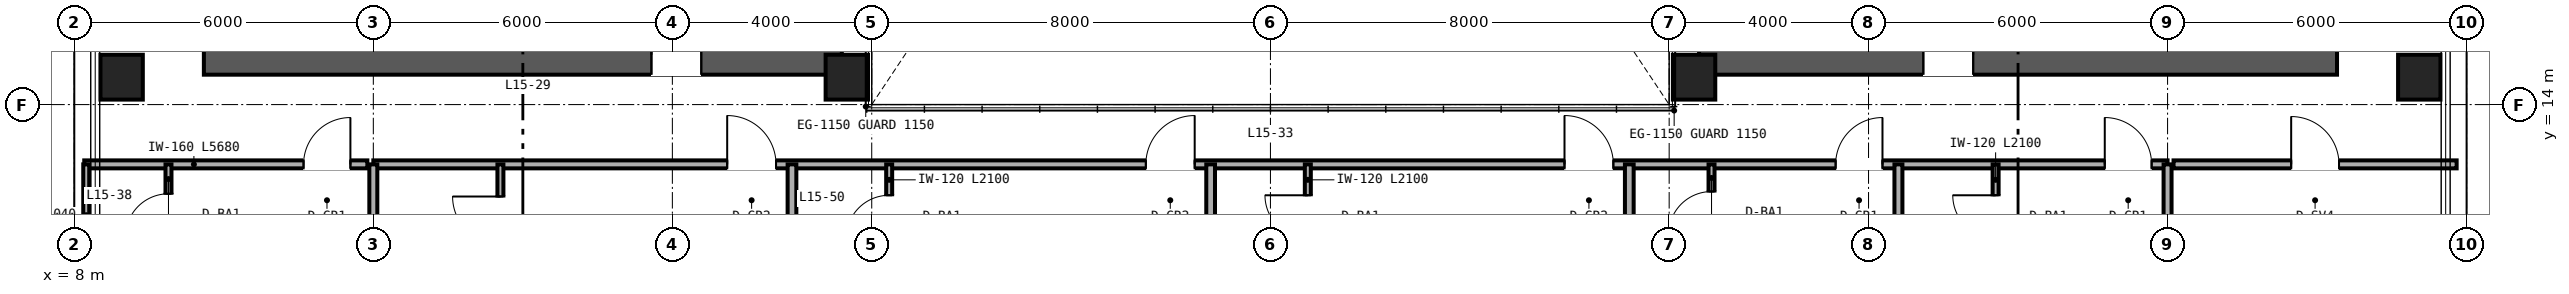
"""IFC4 building model, lengths in metres.
Left out: names, types, materials, properties, quantities, classifications, styles, units other than length and angle.
Written with IfcOpenShell. Run it as: python <this file> out.ifc"""

import sys

from ifc_helpers import new_model, si_unit, direction, frame, frame_2d, origin, origin_2d, place, context, subcontext, project, spatial, rectangle, hollow_rectangle, extrude, source, transform, mapped, element, fill, save


model = new_model("IFC4")
c1 = context("Model", 3, precision=1e-05, world=origin(), true_north=direction((0.0, 1.0)))
c2 = subcontext(c1, "Body", "Model", "MODEL_VIEW")
j1 = project(units=[si_unit("LENGTHUNIT", "METRE"), si_unit("PLANEANGLEUNIT", "RADIAN")], contexts=[c1])
p1 = place(None, origin())
s1 = spatial("IfcSite", under=j1, at=p1, CompositionType="ELEMENT")
p2 = place(p1, origin())
s2 = spatial("IfcBuilding", under=s1, at=p2, CompositionType="ELEMENT")
p3 = place(p2, frame((0.0, 0.0, 63.6)))
s3 = spatial("IfcBuildingStorey", under=s2, at=p3, CompositionType="ELEMENT", Elevation=63.6)
p4 = place(p3, frame((10.6, 15.0, 0.0), z_axis=(0.0, 0.0, 1.0), x_axis=(1.0, 0.0, 0.0)))
e1 = element("IfcWall", 1, at=p4, inside=s3, PredefinedType="SHEAR", context=c2, shape_type="SweptSolid", body=[
    extrude(rectangle(XDim=12.8, YDim=0.8, at=frame_2d((6.4, 0.0))), origin(), (0.0, 0.0, 1.0), 3.35),
])
p5 = place(p4, frame((8.98, 0.0, 0.0)))
e2 = element("IfcOpeningElement", 2, at=p5, cuts=e1, PredefinedType="OPENING", context=c2, shape_type="SweptSolid", body=[
    extrude(rectangle(XDim=1.0, YDim=2.15, at=frame_2d((0.5, 1.075))), frame((0.0, 0.41, 0.0), z_axis=(0.0, -1.0, 0.0), x_axis=(1.0, 0.0, 0.0)), (0.0, 0.0, 1.0), 0.82),
])
p6 = place(p3, frame((40.6, 15.0, 0.0), z_axis=(0.0, 0.0, 1.0), x_axis=(1.0, 0.0, 0.0)))
e3 = element("IfcWall", 3, at=p6, inside=s3, PredefinedType="SHEAR", context=c2, shape_type="SweptSolid", body=[
    extrude(rectangle(XDim=12.8, YDim=0.8, at=frame_2d((6.4, 0.0))), origin(), (0.0, 0.0, 1.0), 3.35),
])
p7 = place(p6, frame((4.5, 0.0, 0.0)))
e4 = element("IfcOpeningElement", 4, at=p7, cuts=e3, PredefinedType="OPENING", context=c2, shape_type="SweptSolid", body=[
    extrude(rectangle(XDim=1.0, YDim=2.15, at=frame_2d((0.5, 1.075))), frame((0.0, 0.41, 0.0), z_axis=(0.0, -1.0, 0.0), x_axis=(1.0, 0.0, 0.0)), (0.0, 0.0, 1.0), 0.82),
])
m1 = source(origin(), c2, "Body", "SweptSolid", [
    extrude(hollow_rectangle(XDim=0.85, YDim=0.9, WallThickness=0.04, at=origin_2d()), origin(), (0.0, 0.0, 1.0), 3.35),
])
for number, where, z_axis, x_axis in (
    (5, (8.95, 14.55, 0.0), (0.0, 0.0, 1.0), (1.0, 0.0, 0.0)),
    (6, (23.5, 14.55, 0.0), (0.0, 0.0, 1.0), (1.0, 0.0, 0.0)),
    (7, (40.5, 14.55, 0.0), (0.0, 0.0, 1.0), (1.0, 0.0, 0.0)),
    (8, (55.05, 14.55, 0.0), (0.0, 0.0, 1.0), (1.0, 0.0, 0.0)),
):
    element("IfcColumn", number, at=place(p3, frame(where, z_axis=z_axis, x_axis=x_axis)), inside=s3, PredefinedType="COLUMN", context=c2, shape_type="MappedRepresentation", body=[
        mapped(m1, transform((0.0, 0.0, 0.0), scale=1.0)),
    ])
p8 = place(p3, frame((8.2, 12.8, 0.0), z_axis=(0.0, 0.0, 1.0), x_axis=(1.0, 0.0, 0.0)))
e9 = element("IfcWall", 9, at=p8, inside=s3, PredefinedType="PARTITIONING", context=c2, shape_type="SweptSolid", body=[
    extrude(rectangle(XDim=5.68, YDim=0.16, at=frame_2d((2.84, 0.0))), origin(), (0.0, 0.0, 1.0), 3.35),
])
p9 = place(p8, frame((4.4, 0.0, 0.0)))
e10 = element("IfcOpeningElement", 10, at=p9, cuts=e9, PredefinedType="OPENING", context=c2, shape_type="SweptSolid", body=[
    extrude(rectangle(XDim=0.94, YDim=2.15, at=frame_2d((0.47, 1.075))), frame((0.0, 0.09, 0.0), z_axis=(0.0, -1.0, 0.0), x_axis=(1.0, 0.0, 0.0)), (0.0, 0.0, 1.0), 0.18),
])
p10 = place(p3, frame((9.89, 10.76, 0.0), z_axis=(0.0, 0.0, 1.0), x_axis=(0.0, 1.0, 0.0)))
e11 = element("IfcWall", 11, at=p10, inside=s3, PredefinedType="PARTITIONING", context=c2, shape_type="SweptSolid", body=[
    extrude(rectangle(XDim=2.04, YDim=0.12, at=frame_2d((1.02, 0.0))), origin(), (0.0, 0.0, 1.0), 3.35),
])
p11 = place(p10, frame((0.59, 0.0, 0.0)))
e12 = element("IfcOpeningElement", 12, at=p11, cuts=e11, PredefinedType="OPENING", context=c2, shape_type="SweptSolid", body=[
    extrude(rectangle(XDim=0.86, YDim=2.1, at=frame_2d((0.43, 1.05))), frame((0.0, 0.07, 0.0), z_axis=(0.0, -1.0, 0.0), x_axis=(1.0, 0.0, 0.0)), (0.0, 0.0, 1.0), 0.14),
])
p12 = place(p3, frame((8.24, 10.76, 0.0), z_axis=(0.0, 0.0, 1.0), x_axis=(0.0, 1.0, 0.0)))
e13 = element("IfcWall", 13, at=p12, inside=s3, PredefinedType="PARTITIONING", context=c2, shape_type="SweptSolid", body=[
    extrude(rectangle(XDim=2.04, YDim=0.12, at=frame_2d((1.02, 0.0))), origin(), (0.0, 0.0, 1.0), 3.35),
])
p13 = place(p3, frame((50.12, 12.8, 0.0), z_axis=(0.0, 0.0, 1.0), x_axis=(1.0, 0.0, 0.0)))
e14 = element("IfcWall", 14, at=p13, inside=s3, PredefinedType="PARTITIONING", context=c2, shape_type="SweptSolid", body=[
    extrude(rectangle(XDim=5.68, YDim=0.16, at=frame_2d((2.84, 0.0))), origin(), (0.0, 0.0, 1.0), 3.35),
])
p14 = place(p13, frame((2.36, 0.0, 0.0)))
e15 = element("IfcOpeningElement", 15, at=p14, cuts=e14, PredefinedType="OPENING", context=c2, shape_type="SweptSolid", body=[
    extrude(rectangle(XDim=0.96, YDim=2.15, at=frame_2d((0.48, 1.075))), frame((0.0, 0.09, 0.0), z_axis=(0.0, -1.0, 0.0), x_axis=(1.0, 0.0, 0.0)), (0.0, 0.0, 1.0), 0.18),
])
p15 = place(p3, frame((14.0, 12.8, 0.0), z_axis=(0.0, 0.0, 1.0), x_axis=(1.0, 0.0, 0.0)))
e16 = element("IfcWall", 16, at=p15, inside=s3, PredefinedType="PARTITIONING", context=c2, shape_type="SweptSolid", body=[
    extrude(rectangle(XDim=36.0, YDim=0.16, at=frame_2d((18.0, 0.0))), origin(), (0.0, 0.0, 1.0), 2.571),
])
p16 = place(p15, frame((7.1, 0.0, 0.0)))
e17 = element("IfcOpeningElement", 17, at=p16, cuts=e16, PredefinedType="OPENING", context=c2, shape_type="SweptSolid", body=[
    extrude(rectangle(XDim=0.98, YDim=2.2, at=frame_2d((0.49, 1.1))), frame((0.0, 0.09, 0.0), z_axis=(0.0, -1.0, 0.0), x_axis=(1.0, 0.0, 0.0)), (0.0, 0.0, 1.0), 0.18),
])
p17 = place(p15, frame((15.5, 0.0, 0.0)))
e18 = element("IfcOpeningElement", 18, at=p17, cuts=e16, PredefinedType="OPENING", context=c2, shape_type="SweptSolid", body=[
    extrude(rectangle(XDim=0.98, YDim=2.2, at=frame_2d((0.49, 1.1))), frame((0.0, 0.09, 0.0), z_axis=(0.0, -1.0, 0.0), x_axis=(1.0, 0.0, 0.0)), (0.0, 0.0, 1.0), 0.18),
])
p18 = place(p15, frame((23.9, 0.0, 0.0)))
e19 = element("IfcOpeningElement", 19, at=p18, cuts=e16, PredefinedType="OPENING", context=c2, shape_type="SweptSolid", body=[
    extrude(rectangle(XDim=0.98, YDim=2.2, at=frame_2d((0.49, 1.1))), frame((0.0, 0.09, 0.0), z_axis=(0.0, -1.0, 0.0), x_axis=(1.0, 0.0, 0.0)), (0.0, 0.0, 1.0), 0.18),
])
p19 = place(p15, frame((29.34, 0.0, 0.0)))
e20 = element("IfcOpeningElement", 20, at=p19, cuts=e16, PredefinedType="OPENING", context=c2, shape_type="SweptSolid", body=[
    extrude(rectangle(XDim=0.94, YDim=2.15, at=frame_2d((0.47, 1.075))), frame((0.0, 0.09, 0.0), z_axis=(0.0, -1.0, 0.0), x_axis=(1.0, 0.0, 0.0)), (0.0, 0.0, 1.0), 0.18),
])
p20 = place(p15, frame((34.74, 0.0, 0.0)))
e21 = element("IfcOpeningElement", 21, at=p20, cuts=e16, PredefinedType="OPENING", context=c2, shape_type="SweptSolid", body=[
    extrude(rectangle(XDim=0.94, YDim=2.15, at=frame_2d((0.47, 1.075))), frame((0.0, 0.09, 0.0), z_axis=(0.0, -1.0, 0.0), x_axis=(1.0, 0.0, 0.0)), (0.0, 0.0, 1.0), 0.18),
])
for number, where, z_axis, x_axis in (
    (22, (14.0, 2.36, 0.0), (0.0, 0.0, 1.0), (0.0, 1.0, 0.0)),
    (23, (50.0, 2.36, 0.0), (0.0, 0.0, 1.0), (0.0, 1.0, 0.0)),
):
    element("IfcWall", number, at=place(p3, frame(where, z_axis=z_axis, x_axis=x_axis)), inside=s3, PredefinedType="PARTITIONING", context=c2, shape_type="SweptSolid", body=[
        extrude(rectangle(XDim=10.44, YDim=0.16, at=frame_2d((5.22, 0.0))), origin(), (0.0, 0.0, 1.0), 2.657),
    ])
p21 = place(p3, frame((22.4, 2.36, 0.0), z_axis=(0.0, 0.0, 1.0), x_axis=(0.0, 1.0, 0.0)))
e24 = element("IfcWall", 24, at=p21, inside=s3, PredefinedType="PARTITIONING", context=c2, shape_type="SweptSolid", body=[
    extrude(rectangle(XDim=10.44, YDim=0.175, at=frame_2d((5.22, 0.0))), origin(), (0.0, 0.0, 1.0), 2.813),
])
p22 = place(p3, frame((16.55, 10.55, 0.0), z_axis=(0.0, 0.0, 1.0), x_axis=(0.0, 1.0, 0.0)))
e25 = element("IfcWall", 25, at=p22, inside=s3, PredefinedType="PARTITIONING", context=c2, shape_type="SweptSolid", body=[
    extrude(rectangle(XDim=2.25, YDim=0.12, at=frame_2d((1.125, 0.0))), origin(), (0.0, 0.0, 1.0), 3.35),
])
p23 = place(p22, frame((0.645, 0.0, 0.0)))
e26 = element("IfcOpeningElement", 26, at=p23, cuts=e25, PredefinedType="OPENING", context=c2, shape_type="SweptSolid", body=[
    extrude(rectangle(XDim=0.96, YDim=2.15, at=frame_2d((0.48, 1.075))), frame((0.0, 0.07, 0.0), z_axis=(0.0, -1.0, 0.0), x_axis=(1.0, 0.0, 0.0)), (0.0, 0.0, 1.0), 0.14),
])
p24 = place(p3, frame((30.8, 2.36, 0.0), z_axis=(0.0, 0.0, 1.0), x_axis=(0.0, 1.0, 0.0)))
e27 = element("IfcWall", 27, at=p24, inside=s3, PredefinedType="PARTITIONING", context=c2, shape_type="SweptSolid", body=[
    extrude(rectangle(XDim=10.44, YDim=0.175, at=frame_2d((5.22, 0.0))), origin(), (0.0, 0.0, 1.0), 2.423),
])
p25 = place(p3, frame((24.35, 10.7, 0.0), z_axis=(0.0, 0.0, 1.0), x_axis=(0.0, 1.0, 0.0)))
e28 = element("IfcWall", 28, at=p25, inside=s3, PredefinedType="PARTITIONING", context=c2, shape_type="SweptSolid", body=[
    extrude(rectangle(XDim=2.1, YDim=0.12, at=frame_2d((1.05, 0.0))), origin(), (0.0, 0.0, 1.0), 3.35),
])
p26 = place(p25, frame((0.62, 0.0, 0.0)))
e29 = element("IfcOpeningElement", 29, at=p26, cuts=e28, PredefinedType="OPENING", context=c2, shape_type="SweptSolid", body=[
    extrude(rectangle(XDim=0.86, YDim=2.1, at=frame_2d((0.43, 1.05))), frame((0.0, 0.07, 0.0), z_axis=(0.0, -1.0, 0.0), x_axis=(1.0, 0.0, 0.0)), (0.0, 0.0, 1.0), 0.14),
])
p27 = place(p3, frame((39.2, 2.36, 0.0), z_axis=(0.0, 0.0, 1.0), x_axis=(0.0, 1.0, 0.0)))
e30 = element("IfcWall", 30, at=p27, inside=s3, PredefinedType="PARTITIONING", context=c2, shape_type="SweptSolid", body=[
    extrude(rectangle(XDim=10.44, YDim=0.175, at=frame_2d((5.22, 0.0))), origin(), (0.0, 0.0, 1.0), 2.423),
])
p28 = place(p3, frame((32.75, 10.7, 0.0), z_axis=(0.0, 0.0, 1.0), x_axis=(0.0, 1.0, 0.0)))
e31 = element("IfcWall", 31, at=p28, inside=s3, PredefinedType="PARTITIONING", context=c2, shape_type="SweptSolid", body=[
    extrude(rectangle(XDim=2.1, YDim=0.12, at=frame_2d((1.05, 0.0))), origin(), (0.0, 0.0, 1.0), 3.35),
])
p29 = place(p28, frame((0.62, 0.0, 0.0)))
e32 = element("IfcOpeningElement", 32, at=p29, cuts=e31, PredefinedType="OPENING", context=c2, shape_type="SweptSolid", body=[
    extrude(rectangle(XDim=0.86, YDim=2.1, at=frame_2d((0.43, 1.05))), frame((0.0, 0.07, 0.0), z_axis=(0.0, -1.0, 0.0), x_axis=(1.0, 0.0, 0.0)), (0.0, 0.0, 1.0), 0.14),
])
p30 = place(p3, frame((44.6, 2.36, 0.0), z_axis=(0.0, 0.0, 1.0), x_axis=(0.0, 1.0, 0.0)))
e33 = element("IfcWall", 33, at=p30, inside=s3, PredefinedType="PARTITIONING", context=c2, shape_type="SweptSolid", body=[
    extrude(rectangle(XDim=10.44, YDim=0.16, at=frame_2d((5.22, 0.0))), origin(), (0.0, 0.0, 1.0), 2.657),
])
p31 = place(p3, frame((40.85, 10.85, 0.0), z_axis=(0.0, 0.0, 1.0), x_axis=(0.0, 1.0, 0.0)))
e34 = element("IfcWall", 34, at=p31, inside=s3, PredefinedType="PARTITIONING", context=c2, shape_type="SweptSolid", body=[
    extrude(rectangle(XDim=1.95, YDim=0.12, at=frame_2d((0.975, 0.0))), origin(), (0.0, 0.0, 1.0), 3.35),
])
p32 = place(p31, frame((0.545, 0.0, 0.0)))
e35 = element("IfcOpeningElement", 35, at=p32, cuts=e34, PredefinedType="OPENING", context=c2, shape_type="SweptSolid", body=[
    extrude(rectangle(XDim=0.86, YDim=2.1, at=frame_2d((0.43, 1.05))), frame((0.0, 0.07, 0.0), z_axis=(0.0, -1.0, 0.0), x_axis=(1.0, 0.0, 0.0)), (0.0, 0.0, 1.0), 0.14),
])
p33 = place(p3, frame((46.55, 10.7, 0.0), z_axis=(0.0, 0.0, 1.0), x_axis=(0.0, 1.0, 0.0)))
e36 = element("IfcWall", 36, at=p33, inside=s3, PredefinedType="PARTITIONING", context=c2, shape_type="SweptSolid", body=[
    extrude(rectangle(XDim=2.1, YDim=0.12, at=frame_2d((1.05, 0.0))), origin(), (0.0, 0.0, 1.0), 3.35),
])
p34 = place(p33, frame((0.62, 0.0, 0.0)))
e37 = element("IfcOpeningElement", 37, at=p34, cuts=e36, PredefinedType="OPENING", context=c2, shape_type="SweptSolid", body=[
    extrude(rectangle(XDim=0.86, YDim=2.1, at=frame_2d((0.43, 1.05))), frame((0.0, 0.07, 0.0), z_axis=(0.0, -1.0, 0.0), x_axis=(1.0, 0.0, 0.0)), (0.0, 0.0, 1.0), 0.14),
])
m2 = source(origin(), c2, "Body", "SweptSolid", [
    extrude(rectangle(XDim=1.0, YDim=2.15, at=frame_2d((0.5, 1.075))), frame((0.0, 0.025, 0.0), z_axis=(0.0, -1.0, 0.0), x_axis=(1.0, 0.0, 0.0)), (0.0, 0.0, 1.0), 0.05),
])
p35 = place(p5, origin())
e38 = element("IfcDoor", 38, at=p35, inside=s3, OperationType="SINGLE_SWING_LEFT", PredefinedType="DOOR", context=c2, shape_type="MappedRepresentation", body=[
    mapped(m2, transform((0.0, 0.0, 0.0), scale=1.0)),
])
fill(e2, e38)
p36 = place(p7, origin())
e39 = element("IfcDoor", 39, at=p36, inside=s3, OperationType="SINGLE_SWING_RIGHT", PredefinedType="DOOR", context=c2, shape_type="MappedRepresentation", body=[
    mapped(m2, transform((0.0, 0.0, 0.0), scale=1.0)),
])
fill(e4, e39)
m3 = source(origin(), c2, "Body", "SweptSolid", [
    extrude(rectangle(XDim=0.86, YDim=2.1, at=frame_2d((0.43, 1.05))), frame((0.0, 0.025, 0.0), z_axis=(0.0, -1.0, 0.0), x_axis=(1.0, 0.0, 0.0)), (0.0, 0.0, 1.0), 0.05),
])
p37 = place(p11, origin())
e40 = element("IfcDoor", 40, at=p37, inside=s3, OperationType="SINGLE_SWING_LEFT", PredefinedType="DOOR", context=c2, shape_type="MappedRepresentation", body=[
    mapped(m3, transform((0.0, 0.0, 0.0), scale=1.0)),
])
fill(e12, e40)
m4 = source(origin(), c2, "Body", "SweptSolid", [
    extrude(rectangle(XDim=0.94, YDim=2.15, at=frame_2d((0.47, 1.075))), frame((0.0, 0.025, 0.0), z_axis=(0.0, -1.0, 0.0), x_axis=(1.0, 0.0, 0.0)), (0.0, 0.0, 1.0), 0.05),
])
p38 = place(p9, origin())
e41 = element("IfcDoor", 41, at=p38, inside=s3, OperationType="SINGLE_SWING_RIGHT", PredefinedType="DOOR", context=c2, shape_type="MappedRepresentation", body=[
    mapped(m4, transform((0.0, 0.0, 0.0), scale=1.0)),
])
fill(e10, e41)
m5 = source(origin(), c2, "Body", "SweptSolid", [
    extrude(rectangle(XDim=0.96, YDim=2.15, at=frame_2d((0.48, 1.075))), frame((0.0, 0.025, 0.0), z_axis=(0.0, -1.0, 0.0), x_axis=(1.0, 0.0, 0.0)), (0.0, 0.0, 1.0), 0.05),
])
p39 = place(p14, origin())
e42 = element("IfcDoor", 42, at=p39, inside=s3, OperationType="SINGLE_SWING_LEFT", PredefinedType="DOOR", context=c2, shape_type="MappedRepresentation", body=[
    mapped(m5, transform((0.0, 0.0, 0.0), scale=1.0)),
])
fill(e15, e42)
p40 = place(p23, origin())
e43 = element("IfcDoor", 43, at=p40, inside=s3, OperationType="SINGLE_SWING_RIGHT", PredefinedType="DOOR", context=c2, shape_type="MappedRepresentation", body=[
    mapped(m5, transform((0.0, 0.0, 0.0), scale=1.0)),
])
fill(e26, e43)
p41 = place(p26, origin())
e44 = element("IfcDoor", 44, at=p41, inside=s3, OperationType="SINGLE_SWING_LEFT", PredefinedType="DOOR", context=c2, shape_type="MappedRepresentation", body=[
    mapped(m3, transform((0.0, 0.0, 0.0), scale=1.0)),
])
fill(e29, e44)
p42 = place(p29, origin())
e45 = element("IfcDoor", 45, at=p42, inside=s3, OperationType="SINGLE_SWING_RIGHT", PredefinedType="DOOR", context=c2, shape_type="MappedRepresentation", body=[
    mapped(m3, transform((0.0, 0.0, 0.0), scale=1.0)),
])
fill(e32, e45)
p43 = place(p32, origin())
e46 = element("IfcDoor", 46, at=p43, inside=s3, OperationType="SINGLE_SWING_LEFT", PredefinedType="DOOR", context=c2, shape_type="MappedRepresentation", body=[
    mapped(m3, transform((0.0, 0.0, 0.0), scale=1.0)),
])
fill(e35, e46)
p44 = place(p34, origin())
e47 = element("IfcDoor", 47, at=p44, inside=s3, OperationType="SINGLE_SWING_RIGHT", PredefinedType="DOOR", context=c2, shape_type="MappedRepresentation", body=[
    mapped(m3, transform((0.0, 0.0, 0.0), scale=1.0)),
])
fill(e37, e47)
m6 = source(origin(), c2, "Body", "SweptSolid", [
    extrude(rectangle(XDim=0.98, YDim=2.2, at=frame_2d((0.49, 1.1))), frame((0.0, 0.025, 0.0), z_axis=(0.0, -1.0, 0.0), x_axis=(1.0, 0.0, 0.0)), (0.0, 0.0, 1.0), 0.05),
])
p45 = place(p16, origin())
e48 = element("IfcDoor", 48, at=p45, inside=s3, OperationType="SINGLE_SWING_LEFT", PredefinedType="DOOR", context=c2, shape_type="MappedRepresentation", body=[
    mapped(m6, transform((0.0, 0.0, 0.0), scale=1.0)),
])
fill(e17, e48)
p46 = place(p17, origin())
e49 = element("IfcDoor", 49, at=p46, inside=s3, OperationType="SINGLE_SWING_RIGHT", PredefinedType="DOOR", context=c2, shape_type="MappedRepresentation", body=[
    mapped(m6, transform((0.0, 0.0, 0.0), scale=1.0)),
])
fill(e18, e49)
p47 = place(p18, origin())
e50 = element("IfcDoor", 50, at=p47, inside=s3, OperationType="SINGLE_SWING_LEFT", PredefinedType="DOOR", context=c2, shape_type="MappedRepresentation", body=[
    mapped(m6, transform((0.0, 0.0, 0.0), scale=1.0)),
])
fill(e19, e50)
p48 = place(p19, origin())
e51 = element("IfcDoor", 51, at=p48, inside=s3, OperationType="SINGLE_SWING_RIGHT", PredefinedType="DOOR", context=c2, shape_type="MappedRepresentation", body=[
    mapped(m4, transform((0.0, 0.0, 0.0), scale=1.0)),
])
fill(e20, e51)
p49 = place(p20, origin())
e52 = element("IfcDoor", 52, at=p49, inside=s3, OperationType="SINGLE_SWING_LEFT", PredefinedType="DOOR", context=c2, shape_type="MappedRepresentation", body=[
    mapped(m4, transform((0.0, 0.0, 0.0), scale=1.0)),
])
fill(e21, e52)
save(model, sys.argv[1])
